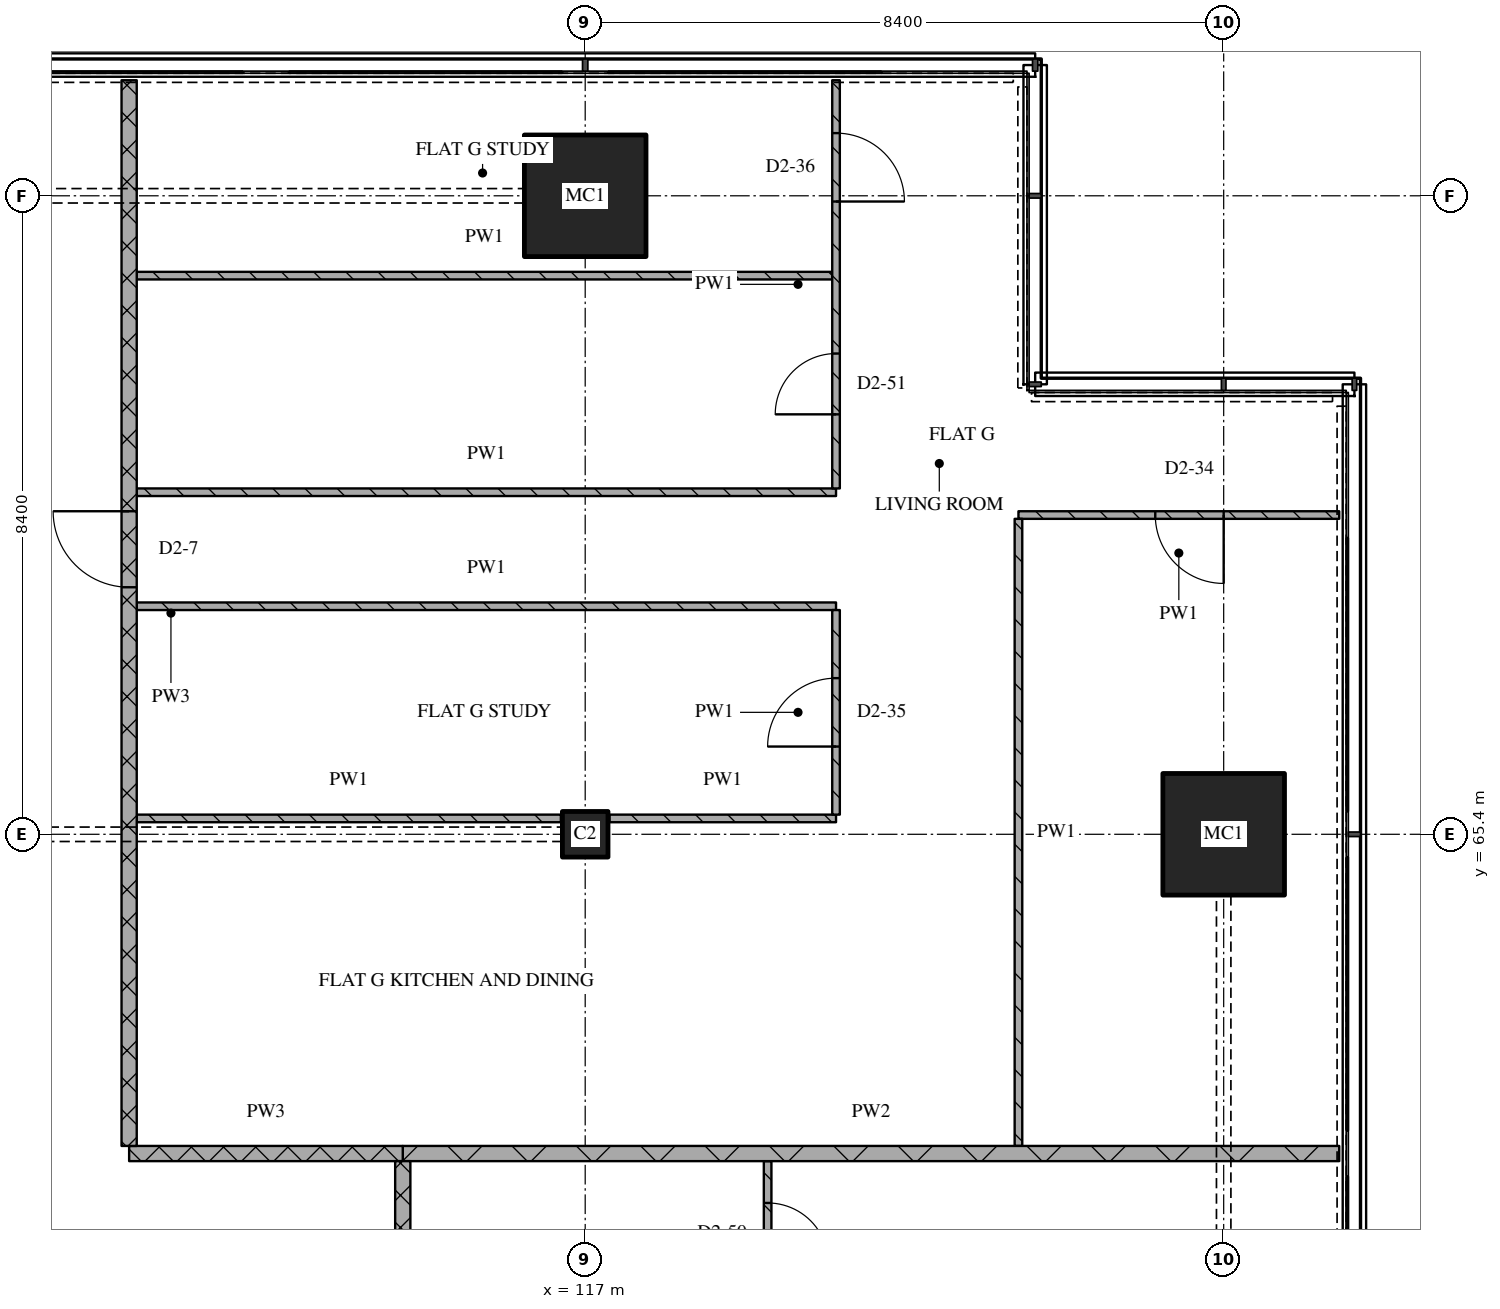
"""IFC4 building model, lengths in metres.
Left out: names, types, materials, properties, quantities, classifications, styles, units other than length and angle.
Written with IfcOpenShell. Run it as: python <this file> out.ifc"""

import sys

from ifc_helpers import new_model, si_unit, direction, frame, frame_2d, origin, origin_2d, place, context, subcontext, project, spatial, rectangle, extrude, element, fill, save


model = new_model("IFC4")
c1 = context("Model", 3, precision=1e-05, world=origin(), true_north=direction((0.0, 1.0)))
c2 = subcontext(c1, "Body", "Model", "MODEL_VIEW")
j1 = project(units=[si_unit("LENGTHUNIT", "METRE"), si_unit("PLANEANGLEUNIT", "RADIAN")], contexts=[c1])
p1 = place(None, origin())
s1 = spatial("IfcSite", under=j1, at=p1, CompositionType="ELEMENT")
p2 = place(p1, origin())
s2 = spatial("IfcBuilding", under=s1, at=p2, CompositionType="ELEMENT")
p3 = place(p2, frame((0.0, 0.0, 219.9)))
s3 = spatial("IfcBuildingStorey", under=s2, at=p3, CompositionType="ELEMENT", Elevation=219.9)
p4 = place(p3, frame((117.0, 65.4, 0.0), z_axis=(0.0, 0.0, 1.0), x_axis=(1.0, 0.0, 0.0)))
e1 = element("IfcColumn", 1, at=p4, inside=s3, PredefinedType="COLUMN", context=c2, shape_type="SweptSolid", body=[
    extrude(rectangle(XDim=0.6, YDim=0.6, at=origin_2d()), origin(), (0.0, 0.0, 1.0), 3.6),
])
for number, where, z_axis, x_axis in (
    (2, (117.0, 73.8, 0.0), (0.0, 0.0, 1.0), (1.0, 0.0, 0.0)),
    (3, (125.4, 65.4, 0.0), (0.0, 0.0, 1.0), (1.0, 0.0, 0.0)),
):
    element("IfcColumn", number, at=place(p3, frame(where, z_axis=z_axis, x_axis=x_axis)), inside=s3, PredefinedType="COLUMN", context=c2, shape_type="SweptSolid", body=[
        extrude(rectangle(XDim=1.6, YDim=1.6, at=origin_2d()), origin(), (0.0, 0.0, 1.0), 3.6),
    ])
p5 = place(p3, frame((111.0, 61.2, 0.0), z_axis=(0.0, 0.0, 1.0), x_axis=(1.0, 0.0, 0.0)))
e4 = element("IfcWall", 4, at=p5, inside=s3, PredefinedType="PARTITIONING", context=c2, shape_type="SweptSolid", body=[
    extrude(rectangle(XDim=3.6, YDim=0.2, at=frame_2d((1.8, 0.0))), origin(), (0.0, 0.0, 1.0), 3.32),
])
p6 = place(p3, frame((114.6, 61.2, 0.0), z_axis=(0.0, 0.0, 1.0), x_axis=(1.0, 0.0, 0.0)))
e5 = element("IfcWall", 5, at=p6, inside=s3, PredefinedType="PARTITIONING", context=c2, shape_type="SweptSolid", body=[
    extrude(rectangle(XDim=12.32, YDim=0.2, at=frame_2d((6.16, 0.0))), origin(), (0.0, 0.0, 1.0), 3.32),
])
p7 = place(p3, frame((111.1, 65.609, 0.0), z_axis=(0.0, 0.0, 1.0), x_axis=(1.0, 0.0, 0.0)))
e6 = element("IfcWall", 6, at=p7, inside=s3, PredefinedType="PARTITIONING", context=c2, shape_type="SweptSolid", body=[
    extrude(rectangle(XDim=5.58, YDim=0.1, at=frame_2d((2.79, 0.0))), origin(), (0.0, 0.0, 1.0), 3.32),
])
p8 = place(p3, frame((117.32, 65.609, 0.0), z_axis=(0.0, 0.0, 1.0), x_axis=(1.0, 0.0, 0.0)))
e7 = element("IfcWall", 7, at=p8, inside=s3, PredefinedType="PARTITIONING", context=c2, shape_type="SweptSolid", body=[
    extrude(rectangle(XDim=2.98, YDim=0.1, at=frame_2d((1.49, 0.0))), origin(), (0.0, 0.0, 1.0), 3.32),
])
p9 = place(p3, frame((111.1, 68.4, 0.0), z_axis=(0.0, 0.0, 1.0), x_axis=(1.0, 0.0, 0.0)))
e8 = element("IfcWall", 8, at=p9, inside=s3, PredefinedType="PARTITIONING", context=c2, shape_type="SweptSolid", body=[
    extrude(rectangle(XDim=9.2, YDim=0.1, at=frame_2d((4.6, 0.0))), origin(), (0.0, 0.0, 1.0), 3.32),
])
p10 = place(p3, frame((126.92, 69.6, 0.0), z_axis=(0.0, 0.0, 1.0), x_axis=(-1.0, 0.0, 0.0)))
e9 = element("IfcWall", 9, at=p10, inside=s3, PredefinedType="PARTITIONING", context=c2, shape_type="SweptSolid", body=[
    extrude(rectangle(XDim=4.22, YDim=0.1, at=frame_2d((2.11, 0.0))), origin(), (0.0, 0.0, 1.0), 3.32),
])
p11 = place(p10, frame((1.52, 0.0, 0.0)))
e10 = element("IfcOpeningElement", 10, at=p11, cuts=e9, PredefinedType="OPENING", context=c2, shape_type="SweptSolid", body=[
    extrude(rectangle(XDim=0.9, YDim=2.1, at=frame_2d((0.45, 1.05))), frame((0.0, 0.06, 0.0), z_axis=(0.0, -1.0, 0.0), x_axis=(1.0, 0.0, 0.0)), (0.0, 0.0, 1.0), 0.12),
])
p12 = place(p3, frame((111.1, 69.9, 0.0), z_axis=(0.0, 0.0, 1.0), x_axis=(1.0, 0.0, 0.0)))
e11 = element("IfcWall", 11, at=p12, inside=s3, PredefinedType="PARTITIONING", context=c2, shape_type="SweptSolid", body=[
    extrude(rectangle(XDim=9.2, YDim=0.1, at=frame_2d((4.6, 0.0))), origin(), (0.0, 0.0, 1.0), 3.32),
])
p13 = place(p3, frame((111.1, 72.75, 0.0), z_axis=(0.0, 0.0, 1.0), x_axis=(1.0, 0.0, 0.0)))
e12 = element("IfcWall", 12, at=p13, inside=s3, PredefinedType="PARTITIONING", context=c2, shape_type="SweptSolid", body=[
    extrude(rectangle(XDim=9.15, YDim=0.1, at=frame_2d((4.575, 0.0))), origin(), (0.0, 0.0, 1.0), 3.32),
])
p14 = place(p3, frame((111.0, 75.32, 0.0), z_axis=(0.0, 0.0, 1.0), x_axis=(0.0, -1.0, 0.0)))
e13 = element("IfcWall", 13, at=p14, inside=s3, PredefinedType="PARTITIONING", context=c2, shape_type="SweptSolid", body=[
    extrude(rectangle(XDim=14.02, YDim=0.2, at=frame_2d((7.01, 0.0))), origin(), (0.0, 0.0, 1.0), 3.32),
])
p15 = place(p14, frame((5.67, 0.0, 0.0)))
e14 = element("IfcOpeningElement", 14, at=p15, cuts=e13, PredefinedType="OPENING", context=c2, shape_type="SweptSolid", body=[
    extrude(rectangle(XDim=1.0, YDim=2.1, at=frame_2d((0.5, 1.05))), frame((0.0, 0.11, 0.0), z_axis=(0.0, -1.0, 0.0), x_axis=(1.0, 0.0, 0.0)), (0.0, 0.0, 1.0), 0.22),
])
p16 = place(p3, frame((114.6, 61.1, 0.0), z_axis=(0.0, 0.0, 1.0), x_axis=(0.0, -1.0, 0.0)))
e15 = element("IfcWall", 15, at=p16, inside=s3, PredefinedType="PARTITIONING", context=c2, shape_type="SweptSolid", body=[
    extrude(rectangle(XDim=17.8, YDim=0.2, at=frame_2d((8.9, 0.0))), origin(), (0.0, 0.0, 1.0), 3.32),
])
p17 = place(p3, frame((119.4, 54.65, 0.0), z_axis=(0.0, 0.0, 1.0), x_axis=(0.0, 1.0, 0.0)))
e16 = element("IfcWall", 16, at=p17, inside=s3, PredefinedType="PARTITIONING", context=c2, shape_type="SweptSolid", body=[
    extrude(rectangle(XDim=6.45, YDim=0.1, at=frame_2d((3.225, 0.0))), origin(), (0.0, 0.0, 1.0), 3.32),
])
p18 = place(p17, frame((1.8, 0.0, 0.0)))
e17 = element("IfcOpeningElement", 17, at=p18, cuts=e16, PredefinedType="OPENING", context=c2, shape_type="SweptSolid", body=[
    extrude(rectangle(XDim=0.8, YDim=2.1, at=frame_2d((0.4, 1.05))), frame((0.0, 0.06, 0.0), z_axis=(0.0, -1.0, 0.0), x_axis=(1.0, 0.0, 0.0)), (0.0, 0.0, 1.0), 0.12),
])
p19 = place(p17, frame((5.1, 0.0, 0.0)))
e18 = element("IfcOpeningElement", 18, at=p19, cuts=e16, PredefinedType="OPENING", context=c2, shape_type="SweptSolid", body=[
    extrude(rectangle(XDim=0.8, YDim=2.1, at=frame_2d((0.4, 1.05))), frame((0.0, 0.06, 0.0), z_axis=(0.0, -1.0, 0.0), x_axis=(1.0, 0.0, 0.0)), (0.0, 0.0, 1.0), 0.12),
])
p20 = place(p3, frame((120.3, 65.659, 0.0), z_axis=(0.0, 0.0, 1.0), x_axis=(0.0, 1.0, 0.0)))
e19 = element("IfcWall", 19, at=p20, inside=s3, PredefinedType="PARTITIONING", context=c2, shape_type="SweptSolid", body=[
    extrude(rectangle(XDim=2.691, YDim=0.1, at=frame_2d((1.346, 0.0))), origin(), (0.0, 0.0, 1.0), 3.32),
])
p21 = place(p20, frame((0.896, 0.0, 0.0)))
e20 = element("IfcOpeningElement", 20, at=p21, cuts=e19, PredefinedType="OPENING", context=c2, shape_type="SweptSolid", body=[
    extrude(rectangle(XDim=0.9, YDim=2.1, at=frame_2d((0.45, 1.05))), frame((0.0, 0.06, 0.0), z_axis=(0.0, -1.0, 0.0), x_axis=(1.0, 0.0, 0.0)), (0.0, 0.0, 1.0), 0.12),
])
p22 = place(p3, frame((120.3, 69.95, 0.0), z_axis=(0.0, 0.0, 1.0), x_axis=(0.0, 1.0, 0.0)))
e21 = element("IfcWall", 21, at=p22, inside=s3, PredefinedType="PARTITIONING", context=c2, shape_type="SweptSolid", body=[
    extrude(rectangle(XDim=5.37, YDim=0.1, at=frame_2d((2.685, 0.0))), origin(), (0.0, 0.0, 1.0), 3.32),
])
p23 = place(p22, frame((0.975, 0.0, 0.0)))
e22 = element("IfcOpeningElement", 22, at=p23, cuts=e21, PredefinedType="OPENING", context=c2, shape_type="SweptSolid", body=[
    extrude(rectangle(XDim=0.8, YDim=2.1, at=frame_2d((0.4, 1.05))), frame((0.0, 0.06, 0.0), z_axis=(0.0, -1.0, 0.0), x_axis=(1.0, 0.0, 0.0)), (0.0, 0.0, 1.0), 0.12),
])
p24 = place(p22, frame((3.775, 0.0, 0.0)))
e23 = element("IfcOpeningElement", 23, at=p24, cuts=e21, PredefinedType="OPENING", context=c2, shape_type="SweptSolid", body=[
    extrude(rectangle(XDim=0.9, YDim=2.1, at=frame_2d((0.45, 1.05))), frame((0.0, 0.06, 0.0), z_axis=(0.0, -1.0, 0.0), x_axis=(1.0, 0.0, 0.0)), (0.0, 0.0, 1.0), 0.12),
])
p25 = place(p3, frame((122.7, 69.55, 0.0), z_axis=(0.0, 0.0, 1.0), x_axis=(0.0, -1.0, 0.0)))
e24 = element("IfcWall", 24, at=p25, inside=s3, PredefinedType="PARTITIONING", context=c2, shape_type="SweptSolid", body=[
    extrude(rectangle(XDim=8.25, YDim=0.1, at=frame_2d((4.125, 0.0))), origin(), (0.0, 0.0, 1.0), 3.32),
])
p26 = place(p11, origin())
e25 = element("IfcDoor", 25, at=p26, inside=s3, OperationType="SINGLE_SWING_LEFT", PredefinedType="DOOR", context=c2, shape_type="SweptSolid", body=[
    extrude(rectangle(XDim=0.9, YDim=2.1, at=frame_2d((0.45, 1.05))), frame((0.0, 0.025, 0.0), z_axis=(0.0, -1.0, 0.0), x_axis=(1.0, 0.0, 0.0)), (0.0, 0.0, 1.0), 0.05),
])
fill(e10, e25)
p27 = place(p15, origin())
e26 = element("IfcDoor", 26, at=p27, inside=s3, OperationType="SINGLE_SWING_RIGHT", PredefinedType="DOOR", context=c2, shape_type="SweptSolid", body=[
    extrude(rectangle(XDim=1.0, YDim=2.1, at=frame_2d((0.5, 1.05))), frame((0.0, 0.025, 0.0), z_axis=(0.0, -1.0, 0.0), x_axis=(1.0, 0.0, 0.0)), (0.0, 0.0, 1.0), 0.05),
])
fill(e14, e26)
p28 = place(p19, origin())
e27 = element("IfcDoor", 27, at=p28, inside=s3, OperationType="SINGLE_SWING_RIGHT", PredefinedType="DOOR", context=c2, shape_type="SweptSolid", body=[
    extrude(rectangle(XDim=0.8, YDim=2.1, at=frame_2d((0.4, 1.05))), frame((0.0, 0.025, 0.0), z_axis=(0.0, -1.0, 0.0), x_axis=(1.0, 0.0, 0.0)), (0.0, 0.0, 1.0), 0.05),
])
fill(e18, e27)
p29 = place(p21, origin())
e28 = element("IfcDoor", 28, at=p29, inside=s3, OperationType="SINGLE_SWING_LEFT", PredefinedType="DOOR", context=c2, shape_type="SweptSolid", body=[
    extrude(rectangle(XDim=0.9, YDim=2.1, at=frame_2d((0.45, 1.05))), frame((0.0, 0.025, 0.0), z_axis=(0.0, -1.0, 0.0), x_axis=(1.0, 0.0, 0.0)), (0.0, 0.0, 1.0), 0.05),
])
fill(e20, e28)
p30 = place(p23, origin())
e29 = element("IfcDoor", 29, at=p30, inside=s3, OperationType="SINGLE_SWING_LEFT", PredefinedType="DOOR", context=c2, shape_type="SweptSolid", body=[
    extrude(rectangle(XDim=0.8, YDim=2.1, at=frame_2d((0.4, 1.05))), frame((0.0, 0.025, 0.0), z_axis=(0.0, -1.0, 0.0), x_axis=(1.0, 0.0, 0.0)), (0.0, 0.0, 1.0), 0.05),
])
fill(e22, e29)
p31 = place(p24, origin())
e30 = element("IfcDoor", 30, at=p31, inside=s3, OperationType="SINGLE_SWING_RIGHT", PredefinedType="DOOR", context=c2, shape_type="SweptSolid", body=[
    extrude(rectangle(XDim=0.9, YDim=2.1, at=frame_2d((0.45, 1.05))), frame((0.0, 0.025, 0.0), z_axis=(0.0, -1.0, 0.0), x_axis=(1.0, 0.0, 0.0)), (0.0, 0.0, 1.0), 0.05),
])
fill(e23, e30)
save(model, sys.argv[1])
